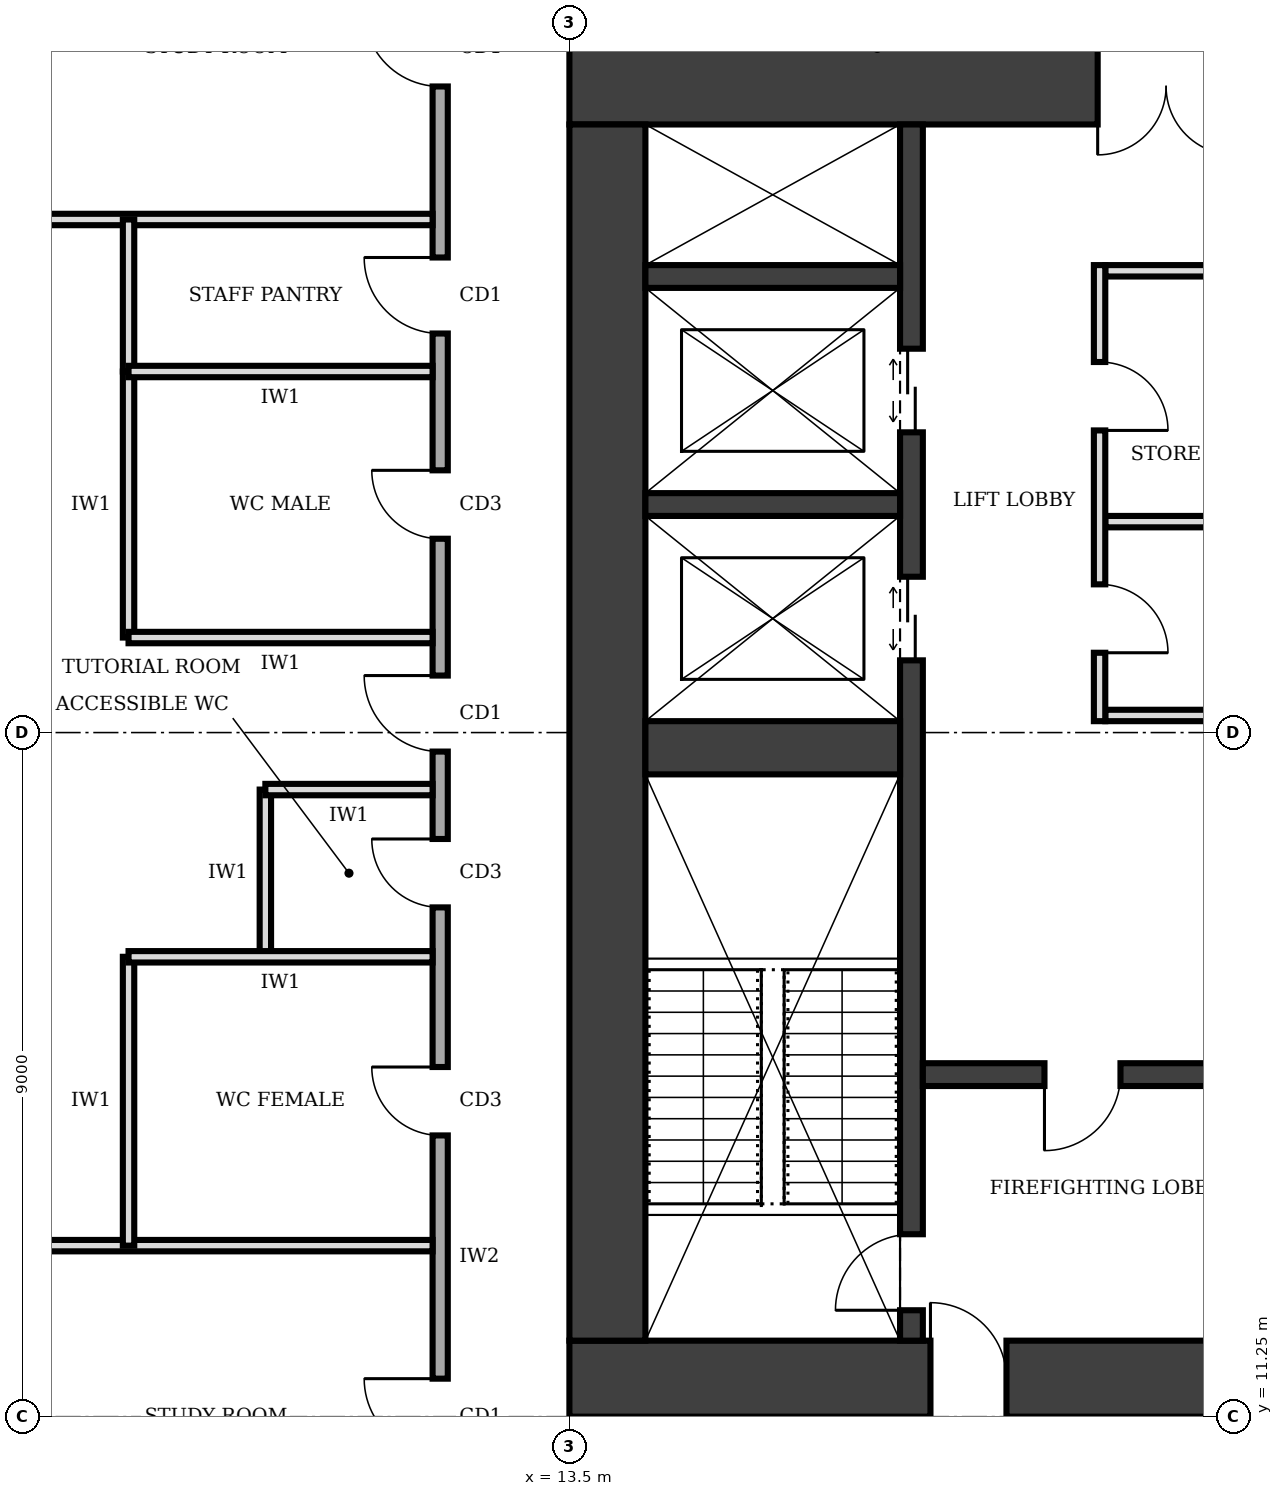
"""IFC4 building model, lengths in metres.
Left out: names, types, materials, properties, quantities, classifications, styles, units other than length and angle.
Written with IfcOpenShell. Run it as: python <this file> out.ifc"""

import sys

from ifc_helpers import new_model, si_unit, direction, frame, frame_2d, origin, place, context, subcontext, project, spatial, rectangle, extrude, element, fill, save


model = new_model("IFC4")
c1 = context("Model", 3, precision=1e-05, world=origin(), true_north=direction((0.0, 1.0)))
c2 = subcontext(c1, "Body", "Model", "MODEL_VIEW")
j1 = project(units=[si_unit("LENGTHUNIT", "METRE"), si_unit("PLANEANGLEUNIT", "RADIAN")], contexts=[c1])
p1 = place(None, origin())
s1 = spatial("IfcSite", under=j1, at=p1, CompositionType="ELEMENT")
p2 = place(p1, origin())
s2 = spatial("IfcBuilding", under=s1, at=p2, CompositionType="ELEMENT")
p3 = place(p2, frame((0.0, 0.0, 37.0)))
s3 = spatial("IfcBuildingStorey", under=s2, at=p3, CompositionType="ELEMENT", Elevation=37.0)
p4 = place(p3, frame((13.5, 11.75, 0.0), z_axis=(0.0, 0.0, 1.0), x_axis=(1.0, 0.0, 0.0)))
e1 = element("IfcWall", 1, at=p4, inside=s3, PredefinedType="SHEAR", context=c2, shape_type="SweptSolid", body=[
    extrude(rectangle(XDim=13.5, YDim=1.0, at=frame_2d((6.75, 0.0))), origin(), (0.0, 0.0, 1.0), 4.0),
])
p5 = place(p4, frame((4.75, 0.0, 0.0)))
e2 = element("IfcOpeningElement", 2, at=p5, cuts=e1, PredefinedType="OPENING", context=c2, shape_type="SweptSolid", body=[
    extrude(rectangle(XDim=1.0, YDim=2.1, at=frame_2d((0.5, 1.05))), frame((0.0, 0.51, 0.0), z_axis=(0.0, -1.0, 0.0), x_axis=(1.0, 0.0, 0.0)), (0.0, 0.0, 1.0), 1.02),
])
p6 = place(p3, frame((27.0, 28.75, 0.0), z_axis=(0.0, 0.0, 1.0), x_axis=(-1.0, 0.0, 0.0)))
e3 = element("IfcWall", 3, at=p6, inside=s3, PredefinedType="SHEAR", context=c2, shape_type="SweptSolid", body=[
    extrude(rectangle(XDim=13.5, YDim=1.0, at=frame_2d((6.75, 0.0))), origin(), (0.0, 0.0, 1.0), 4.0),
])
p7 = place(p6, frame((4.75, 0.0, 0.0)))
e4 = element("IfcOpeningElement", 4, at=p7, cuts=e3, PredefinedType="OPENING", context=c2, shape_type="SweptSolid", body=[
    extrude(rectangle(XDim=1.8, YDim=2.1, at=frame_2d((0.9, 1.05))), frame((0.0, 0.51, 0.0), z_axis=(0.0, -1.0, 0.0), x_axis=(1.0, 0.0, 0.0)), (0.0, 0.0, 1.0), 1.02),
])
p8 = place(p3, frame((14.0, 28.25, 0.0), z_axis=(0.0, 0.0, 1.0), x_axis=(0.0, -1.0, 0.0)))
e5 = element("IfcWall", 5, at=p8, inside=s3, PredefinedType="SHEAR", context=c2, shape_type="SweptSolid", body=[
    extrude(rectangle(XDim=16.0, YDim=1.0, at=frame_2d((8.0, 0.0))), origin(), (0.0, 0.0, 1.0), 4.0),
])
p9 = place(p3, frame((18.0, 12.25, 0.0), z_axis=(0.0, 0.0, 1.0), x_axis=(0.0, 1.0, 0.0)))
e6 = element("IfcWall", 6, at=p9, inside=s3, PredefinedType="SHEAR", context=c2, shape_type="SweptSolid", body=[
    extrude(rectangle(XDim=16.0, YDim=0.3, at=frame_2d((8.0, 0.0))), origin(), (0.0, 0.0, 1.0), 4.0),
])
p10 = place(p9, frame((0.4, 0.0, 0.0)))
e7 = element("IfcOpeningElement", 7, at=p10, cuts=e6, PredefinedType="OPENING", context=c2, shape_type="SweptSolid", body=[
    extrude(rectangle(XDim=1.0, YDim=2.1, at=frame_2d((0.5, 1.05))), frame((0.0, 0.16, 0.0), z_axis=(0.0, -1.0, 0.0), x_axis=(1.0, 0.0, 0.0)), (0.0, 0.0, 1.0), 0.32),
])
p11 = place(p9, frame((8.95, 0.0, 0.0)))
e8 = element("IfcOpeningElement", 8, at=p11, cuts=e6, PredefinedType="OPENING", context=c2, shape_type="SweptSolid", body=[
    extrude(rectangle(XDim=1.1, YDim=2.1, at=frame_2d((0.55, 1.05))), frame((0.0, 0.16, 0.0), z_axis=(0.0, -1.0, 0.0), x_axis=(1.0, 0.0, 0.0)), (0.0, 0.0, 1.0), 0.32),
])
p12 = place(p9, frame((11.95, 0.0, 0.0)))
e9 = element("IfcOpeningElement", 9, at=p12, cuts=e6, PredefinedType="OPENING", context=c2, shape_type="SweptSolid", body=[
    extrude(rectangle(XDim=1.1, YDim=2.1, at=frame_2d((0.55, 1.05))), frame((0.0, 0.16, 0.0), z_axis=(0.0, -1.0, 0.0), x_axis=(1.0, 0.0, 0.0)), (0.0, 0.0, 1.0), 0.32),
])
p13 = place(p3, frame((14.5, 20.05, 0.0), z_axis=(0.0, 0.0, 1.0), x_axis=(1.0, 0.0, 0.0)))
e10 = element("IfcWall", 10, at=p13, inside=s3, PredefinedType="SHEAR", context=c2, shape_type="SweptSolid", body=[
    extrude(rectangle(XDim=3.35, YDim=0.7, at=frame_2d((1.675, 0.0))), origin(), (0.0, 0.0, 1.0), 4.0),
])
p14 = place(p3, frame((18.15, 15.75, 0.0), z_axis=(0.0, 0.0, 1.0), x_axis=(1.0, 0.0, 0.0)))
e11 = element("IfcWall", 11, at=p14, inside=s3, PredefinedType="SHEAR", context=c2, shape_type="SweptSolid", body=[
    extrude(rectangle(XDim=4.2, YDim=0.3, at=frame_2d((2.1, 0.0))), origin(), (0.0, 0.0, 1.0), 4.0),
])
p15 = place(p14, frame((1.6, 0.0, 0.0)))
e12 = element("IfcOpeningElement", 12, at=p15, cuts=e11, PredefinedType="OPENING", context=c2, shape_type="SweptSolid", body=[
    extrude(rectangle(XDim=1.0, YDim=2.1, at=frame_2d((0.5, 1.05))), frame((0.0, 0.16, 0.0), z_axis=(0.0, -1.0, 0.0), x_axis=(1.0, 0.0, 0.0)), (0.0, 0.0, 1.0), 0.32),
])
for number, where, z_axis, x_axis in (
    (13, (14.5, 23.25, 0.0), (0.0, 0.0, 1.0), (1.0, 0.0, 0.0)),
    (14, (14.5, 26.25, 0.0), (0.0, 0.0, 1.0), (1.0, 0.0, 0.0)),
):
    element("IfcWall", number, at=place(p3, frame(where, z_axis=z_axis, x_axis=x_axis)), inside=s3, PredefinedType="SHEAR", context=c2, shape_type="SweptSolid", body=[
        extrude(rectangle(XDim=3.35, YDim=0.3, at=frame_2d((1.675, 0.0))), origin(), (0.0, 0.0, 1.0), 4.0),
    ])
p16 = place(p3, frame((20.475, 20.4, 0.0), z_axis=(0.0, 0.0, 1.0), x_axis=(0.0, 1.0, 0.0)))
e15 = element("IfcWall", 15, at=p16, inside=s3, PredefinedType="PARTITIONING", context=c2, shape_type="SweptSolid", body=[
    extrude(rectangle(XDim=6.0, YDim=0.15, at=frame_2d((3.0, 0.0))), origin(), (0.0, 0.0, 1.0), 3.75),
])
p17 = place(p16, frame((0.9, 0.0, 0.0)))
e16 = element("IfcOpeningElement", 16, at=p17, cuts=e15, PredefinedType="OPENING", context=c2, shape_type="SweptSolid", body=[
    extrude(rectangle(XDim=0.9, YDim=2.1, at=frame_2d((0.45, 1.05))), frame((0.0, 0.085, 0.0), z_axis=(0.0, -1.0, 0.0), x_axis=(1.0, 0.0, 0.0)), (0.0, 0.0, 1.0), 0.17),
])
p18 = place(p16, frame((3.825, 0.0, 0.0)))
e17 = element("IfcOpeningElement", 17, at=p18, cuts=e15, PredefinedType="OPENING", context=c2, shape_type="SweptSolid", body=[
    extrude(rectangle(XDim=0.9, YDim=2.1, at=frame_2d((0.45, 1.05))), frame((0.0, 0.085, 0.0), z_axis=(0.0, -1.0, 0.0), x_axis=(1.0, 0.0, 0.0)), (0.0, 0.0, 1.0), 0.17),
])
for number, where, z_axis, x_axis in (
    (18, (20.55, 20.475, 0.0), (0.0, 0.0, 1.0), (1.0, 0.0, 0.0)),
    (19, (20.55, 23.025, 0.0), (0.0, 0.0, 1.0), (1.0, 0.0, 0.0)),
    (20, (20.55, 26.325, 0.0), (0.0, 0.0, 1.0), (1.0, 0.0, 0.0)),
):
    element("IfcWall", number, at=place(p3, frame(where, z_axis=z_axis, x_axis=x_axis)), inside=s3, PredefinedType="PARTITIONING", context=c2, shape_type="SweptSolid", body=[
        extrude(rectangle(XDim=1.8, YDim=0.15, at=frame_2d((0.9, 0.0))), origin(), (0.0, 0.0, 1.0), 3.75),
    ])
p19 = place(p3, frame((11.8, 31.3, 0.0), z_axis=(0.0, 0.0, 1.0), x_axis=(0.0, -1.0, 0.0)))
e21 = element("IfcWall", 21, at=p19, inside=s3, PredefinedType="SOLIDWALL", context=c2, shape_type="SweptSolid", body=[
    extrude(rectangle(XDim=22.3, YDim=0.2, at=frame_2d((11.15, 0.0))), origin(), (0.0, 0.0, 1.0), 3.75),
])
p20 = place(p19, frame((19.55, 0.0, 0.0)))
e22 = element("IfcOpeningElement", 22, at=p20, cuts=e21, PredefinedType="OPENING", context=c2, shape_type="SweptSolid", body=[
    extrude(rectangle(XDim=1.0, YDim=2.1, at=frame_2d((0.5, 1.05))), frame((0.0, 0.11, 0.0), z_axis=(0.0, -1.0, 0.0), x_axis=(1.0, 0.0, 0.0)), (0.0, 0.0, 1.0), 0.22),
])
p21 = place(p19, frame((15.45, 0.0, 0.0)))
e23 = element("IfcOpeningElement", 23, at=p21, cuts=e21, PredefinedType="OPENING", context=c2, shape_type="SweptSolid", body=[
    extrude(rectangle(XDim=0.9, YDim=2.1, at=frame_2d((0.45, 1.05))), frame((0.0, 0.11, 0.0), z_axis=(0.0, -1.0, 0.0), x_axis=(1.0, 0.0, 0.0)), (0.0, 0.0, 1.0), 0.22),
])
p22 = place(p19, frame((12.45, 0.0, 0.0)))
e24 = element("IfcOpeningElement", 24, at=p22, cuts=e21, PredefinedType="OPENING", context=c2, shape_type="SweptSolid", body=[
    extrude(rectangle(XDim=0.9, YDim=2.1, at=frame_2d((0.45, 1.05))), frame((0.0, 0.11, 0.0), z_axis=(0.0, -1.0, 0.0), x_axis=(1.0, 0.0, 0.0)), (0.0, 0.0, 1.0), 0.22),
])
p23 = place(p19, frame((7.6, 0.0, 0.0)))
e25 = element("IfcOpeningElement", 25, at=p23, cuts=e21, PredefinedType="OPENING", context=c2, shape_type="SweptSolid", body=[
    extrude(rectangle(XDim=0.9, YDim=2.1, at=frame_2d((0.45, 1.05))), frame((0.0, 0.11, 0.0), z_axis=(0.0, -1.0, 0.0), x_axis=(1.0, 0.0, 0.0)), (0.0, 0.0, 1.0), 0.22),
])
p24 = place(p19, frame((4.8, 0.0, 0.0)))
e26 = element("IfcOpeningElement", 26, at=p24, cuts=e21, PredefinedType="OPENING", context=c2, shape_type="SweptSolid", body=[
    extrude(rectangle(XDim=1.0, YDim=2.1, at=frame_2d((0.5, 1.05))), frame((0.0, 0.11, 0.0), z_axis=(0.0, -1.0, 0.0), x_axis=(1.0, 0.0, 0.0)), (0.0, 0.0, 1.0), 0.22),
])
p25 = place(p19, frame((10.3, 0.0, 0.0)))
e27 = element("IfcOpeningElement", 27, at=p25, cuts=e21, PredefinedType="OPENING", context=c2, shape_type="SweptSolid", body=[
    extrude(rectangle(XDim=1.0, YDim=2.1, at=frame_2d((0.5, 1.05))), frame((0.0, 0.11, 0.0), z_axis=(0.0, -1.0, 0.0), x_axis=(1.0, 0.0, 0.0)), (0.0, 0.0, 1.0), 0.22),
])
p26 = place(p19, frame((1.55, 0.0, 0.0)))
e28 = element("IfcOpeningElement", 28, at=p26, cuts=e21, PredefinedType="OPENING", context=c2, shape_type="SweptSolid", body=[
    extrude(rectangle(XDim=1.0, YDim=2.1, at=frame_2d((0.5, 1.05))), frame((0.0, 0.11, 0.0), z_axis=(0.0, -1.0, 0.0), x_axis=(1.0, 0.0, 0.0)), (0.0, 0.0, 1.0), 0.22),
])
for number, where, z_axis, x_axis in (
    (29, (0.3, 13.5, 0.0), (0.0, 0.0, 1.0), (1.0, 0.0, 0.0)),
    (30, (0.3, 27.0, 0.0), (0.0, 0.0, 1.0), (1.0, 0.0, 0.0)),
):
    element("IfcWall", number, at=place(p3, frame(where, z_axis=z_axis, x_axis=x_axis)), inside=s3, PredefinedType="PARTITIONING", context=c2, shape_type="SweptSolid", body=[
        extrude(rectangle(XDim=11.4, YDim=0.15, at=frame_2d((5.7, 0.0))), origin(), (0.0, 0.0, 1.0), 3.75),
    ])
p27 = place(p3, frame((11.7, 17.3, 0.0), z_axis=(0.0, 0.0, 1.0), x_axis=(-1.0, 0.0, 0.0)))
e31 = element("IfcWall", 31, at=p27, inside=s3, PredefinedType="PARTITIONING", context=c2, shape_type="SweptSolid", body=[
    extrude(rectangle(XDim=4.0, YDim=0.15, at=frame_2d((2.0, 0.0))), origin(), (0.0, 0.0, 1.0), 3.75),
])
p28 = place(p3, frame((11.7, 19.5, 0.0), z_axis=(0.0, 0.0, 1.0), x_axis=(-1.0, 0.0, 0.0)))
e32 = element("IfcWall", 32, at=p28, inside=s3, PredefinedType="PARTITIONING", context=c2, shape_type="SweptSolid", body=[
    extrude(rectangle(XDim=2.2, YDim=0.15, at=frame_2d((1.1, 0.0))), origin(), (0.0, 0.0, 1.0), 2.85),
])
for number, where, z_axis, x_axis in (
    (33, (11.7, 21.5, 0.0), (0.0, 0.0, 1.0), (-1.0, 0.0, 0.0)),
    (34, (11.7, 25.0, 0.0), (0.0, 0.0, 1.0), (-1.0, 0.0, 0.0)),
):
    element("IfcWall", number, at=place(p3, frame(where, z_axis=z_axis, x_axis=x_axis)), inside=s3, PredefinedType="PARTITIONING", context=c2, shape_type="SweptSolid", body=[
        extrude(rectangle(XDim=4.0, YDim=0.15, at=frame_2d((2.0, 0.0))), origin(), (0.0, 0.0, 1.0), 3.75),
    ])
p29 = place(p3, frame((7.7, 13.5, 0.0), z_axis=(0.0, 0.0, 1.0), x_axis=(0.0, 1.0, 0.0)))
e35 = element("IfcWall", 35, at=p29, inside=s3, PredefinedType="PARTITIONING", context=c2, shape_type="SweptSolid", body=[
    extrude(rectangle(XDim=3.8, YDim=0.15, at=frame_2d((1.9, 0.0))), origin(), (0.0, 0.0, 1.0), 3.75),
])
p30 = place(p3, frame((9.5, 17.3, 0.0), z_axis=(0.0, 0.0, 1.0), x_axis=(0.0, 1.0, 0.0)))
e36 = element("IfcWall", 36, at=p30, inside=s3, PredefinedType="PARTITIONING", context=c2, shape_type="SweptSolid", body=[
    extrude(rectangle(XDim=2.2, YDim=0.15, at=frame_2d((1.1, 0.0))), origin(), (0.0, 0.0, 1.0), 3.75),
])
p31 = place(p3, frame((7.7, 21.5, 0.0), z_axis=(0.0, 0.0, 1.0), x_axis=(0.0, 1.0, 0.0)))
e37 = element("IfcWall", 37, at=p31, inside=s3, PredefinedType="PARTITIONING", context=c2, shape_type="SweptSolid", body=[
    extrude(rectangle(XDim=3.5, YDim=0.15, at=frame_2d((1.75, 0.0))), origin(), (0.0, 0.0, 1.0), 3.75),
])
p32 = place(p3, frame((7.7, 25.0, 0.0), z_axis=(0.0, 0.0, 1.0), x_axis=(0.0, 1.0, 0.0)))
e38 = element("IfcWall", 38, at=p32, inside=s3, PredefinedType="PARTITIONING", context=c2, shape_type="SweptSolid", body=[
    extrude(rectangle(XDim=2.0, YDim=0.15, at=frame_2d((1.0, 0.0))), origin(), (0.0, 0.0, 1.0), 3.75),
])
p33 = place(p5, origin())
e39 = element("IfcDoor", 39, at=p33, inside=s3, OperationType="SINGLE_SWING_LEFT", PredefinedType="DOOR", context=c2, shape_type="SweptSolid", body=[
    extrude(rectangle(XDim=1.0, YDim=2.1, at=frame_2d((0.5, 1.05))), frame((0.0, 0.025, 0.0), z_axis=(0.0, -1.0, 0.0), x_axis=(1.0, 0.0, 0.0)), (0.0, 0.0, 1.0), 0.05),
])
fill(e2, e39)
p34 = place(p7, origin())
e40 = element("IfcDoor", 40, at=p34, inside=s3, OperationType="DOUBLE_DOOR_SINGLE_SWING", PredefinedType="DOOR", context=c2, shape_type="SweptSolid", body=[
    extrude(rectangle(XDim=1.8, YDim=2.1, at=frame_2d((0.9, 1.05))), frame((0.0, 0.025, 0.0), z_axis=(0.0, -1.0, 0.0), x_axis=(1.0, 0.0, 0.0)), (0.0, 0.0, 1.0), 0.05),
])
fill(e4, e40)
p35 = place(p15, frame((1.0, 0.0, 0.0), z_axis=(0.0, 0.0, 1.0), x_axis=(-1.0, 0.0, 0.0)))
e41 = element("IfcDoor", 41, at=p35, inside=s3, OperationType="SINGLE_SWING_RIGHT", PredefinedType="DOOR", context=c2, shape_type="SweptSolid", body=[
    extrude(rectangle(XDim=1.0, YDim=2.1, at=frame_2d((0.5, 1.05))), frame((0.0, 0.025, 0.0), z_axis=(0.0, -1.0, 0.0), x_axis=(1.0, 0.0, 0.0)), (0.0, 0.0, 1.0), 0.05),
])
fill(e12, e41)
p36 = place(p10, origin())
e42 = element("IfcDoor", 42, at=p36, inside=s3, OperationType="SINGLE_SWING_LEFT", PredefinedType="DOOR", context=c2, shape_type="SweptSolid", body=[
    extrude(rectangle(XDim=1.0, YDim=2.1, at=frame_2d((0.5, 1.05))), frame((0.0, 0.025, 0.0), z_axis=(0.0, -1.0, 0.0), x_axis=(1.0, 0.0, 0.0)), (0.0, 0.0, 1.0), 0.05),
])
fill(e7, e42)
p37 = place(p11, origin())
e43 = element("IfcDoor", 43, at=p37, inside=s3, OperationType="DOUBLE_DOOR_SLIDING", PredefinedType="DOOR", context=c2, shape_type="SweptSolid", body=[
    extrude(rectangle(XDim=1.1, YDim=2.1, at=frame_2d((0.55, 1.05))), frame((0.0, 0.025, 0.0), z_axis=(0.0, -1.0, 0.0), x_axis=(1.0, 0.0, 0.0)), (0.0, 0.0, 1.0), 0.05),
])
fill(e8, e43)
p38 = place(p12, origin())
e44 = element("IfcDoor", 44, at=p38, inside=s3, OperationType="DOUBLE_DOOR_SLIDING", PredefinedType="DOOR", context=c2, shape_type="SweptSolid", body=[
    extrude(rectangle(XDim=1.1, YDim=2.1, at=frame_2d((0.55, 1.05))), frame((0.0, 0.025, 0.0), z_axis=(0.0, -1.0, 0.0), x_axis=(1.0, 0.0, 0.0)), (0.0, 0.0, 1.0), 0.05),
])
fill(e9, e44)
p39 = place(p17, frame((0.9, 0.0, 0.0), z_axis=(0.0, 0.0, 1.0), x_axis=(-1.0, 0.0, 0.0)))
e45 = element("IfcDoor", 45, at=p39, inside=s3, OperationType="SINGLE_SWING_RIGHT", PredefinedType="DOOR", context=c2, shape_type="SweptSolid", body=[
    extrude(rectangle(XDim=0.9, YDim=2.1, at=frame_2d((0.45, 1.05))), frame((0.0, 0.025, 0.0), z_axis=(0.0, -1.0, 0.0), x_axis=(1.0, 0.0, 0.0)), (0.0, 0.0, 1.0), 0.05),
])
fill(e16, e45)
p40 = place(p18, frame((0.9, 0.0, 0.0), z_axis=(0.0, 0.0, 1.0), x_axis=(-1.0, 0.0, 0.0)))
e46 = element("IfcDoor", 46, at=p40, inside=s3, OperationType="SINGLE_SWING_RIGHT", PredefinedType="DOOR", context=c2, shape_type="SweptSolid", body=[
    extrude(rectangle(XDim=0.9, YDim=2.1, at=frame_2d((0.45, 1.05))), frame((0.0, 0.025, 0.0), z_axis=(0.0, -1.0, 0.0), x_axis=(1.0, 0.0, 0.0)), (0.0, 0.0, 1.0), 0.05),
])
fill(e17, e46)
p41 = place(p20, frame((1.0, 0.0, 0.0), z_axis=(0.0, 0.0, 1.0), x_axis=(-1.0, 0.0, 0.0)))
e47 = element("IfcDoor", 47, at=p41, inside=s3, OperationType="SINGLE_SWING_RIGHT", PredefinedType="DOOR", context=c2, shape_type="SweptSolid", body=[
    extrude(rectangle(XDim=1.0, YDim=2.1, at=frame_2d((0.5, 1.05))), frame((0.0, 0.025, 0.0), z_axis=(0.0, -1.0, 0.0), x_axis=(1.0, 0.0, 0.0)), (0.0, 0.0, 1.0), 0.05),
])
fill(e22, e47)
p42 = place(p21, frame((0.9, 0.0, 0.0), z_axis=(0.0, 0.0, 1.0), x_axis=(-1.0, 0.0, 0.0)))
e48 = element("IfcDoor", 48, at=p42, inside=s3, OperationType="SINGLE_SWING_RIGHT", PredefinedType="DOOR", context=c2, shape_type="SweptSolid", body=[
    extrude(rectangle(XDim=0.9, YDim=2.1, at=frame_2d((0.45, 1.05))), frame((0.0, 0.025, 0.0), z_axis=(0.0, -1.0, 0.0), x_axis=(1.0, 0.0, 0.0)), (0.0, 0.0, 1.0), 0.05),
])
fill(e23, e48)
p43 = place(p22, frame((0.9, 0.0, 0.0), z_axis=(0.0, 0.0, 1.0), x_axis=(-1.0, 0.0, 0.0)))
e49 = element("IfcDoor", 49, at=p43, inside=s3, OperationType="SINGLE_SWING_RIGHT", PredefinedType="DOOR", context=c2, shape_type="SweptSolid", body=[
    extrude(rectangle(XDim=0.9, YDim=2.1, at=frame_2d((0.45, 1.05))), frame((0.0, 0.025, 0.0), z_axis=(0.0, -1.0, 0.0), x_axis=(1.0, 0.0, 0.0)), (0.0, 0.0, 1.0), 0.05),
])
fill(e24, e49)
p44 = place(p23, frame((0.9, 0.0, 0.0), z_axis=(0.0, 0.0, 1.0), x_axis=(-1.0, 0.0, 0.0)))
e50 = element("IfcDoor", 50, at=p44, inside=s3, OperationType="SINGLE_SWING_RIGHT", PredefinedType="DOOR", context=c2, shape_type="SweptSolid", body=[
    extrude(rectangle(XDim=0.9, YDim=2.1, at=frame_2d((0.45, 1.05))), frame((0.0, 0.025, 0.0), z_axis=(0.0, -1.0, 0.0), x_axis=(1.0, 0.0, 0.0)), (0.0, 0.0, 1.0), 0.05),
])
fill(e25, e50)
p45 = place(p24, frame((1.0, 0.0, 0.0), z_axis=(0.0, 0.0, 1.0), x_axis=(-1.0, 0.0, 0.0)))
e51 = element("IfcDoor", 51, at=p45, inside=s3, OperationType="SINGLE_SWING_RIGHT", PredefinedType="DOOR", context=c2, shape_type="SweptSolid", body=[
    extrude(rectangle(XDim=1.0, YDim=2.1, at=frame_2d((0.5, 1.05))), frame((0.0, 0.025, 0.0), z_axis=(0.0, -1.0, 0.0), x_axis=(1.0, 0.0, 0.0)), (0.0, 0.0, 1.0), 0.05),
])
fill(e26, e51)
p46 = place(p25, frame((1.0, 0.0, 0.0), z_axis=(0.0, 0.0, 1.0), x_axis=(-1.0, 0.0, 0.0)))
e52 = element("IfcDoor", 52, at=p46, inside=s3, OperationType="SINGLE_SWING_RIGHT", PredefinedType="DOOR", context=c2, shape_type="SweptSolid", body=[
    extrude(rectangle(XDim=1.0, YDim=2.1, at=frame_2d((0.5, 1.05))), frame((0.0, 0.025, 0.0), z_axis=(0.0, -1.0, 0.0), x_axis=(1.0, 0.0, 0.0)), (0.0, 0.0, 1.0), 0.05),
])
fill(e27, e52)
p47 = place(p26, frame((1.0, 0.0, 0.0), z_axis=(0.0, 0.0, 1.0), x_axis=(-1.0, 0.0, 0.0)))
e53 = element("IfcDoor", 53, at=p47, inside=s3, OperationType="SINGLE_SWING_RIGHT", PredefinedType="DOOR", context=c2, shape_type="SweptSolid", body=[
    extrude(rectangle(XDim=1.0, YDim=2.1, at=frame_2d((0.5, 1.05))), frame((0.0, 0.025, 0.0), z_axis=(0.0, -1.0, 0.0), x_axis=(1.0, 0.0, 0.0)), (0.0, 0.0, 1.0), 0.05),
])
fill(e28, e53)
save(model, sys.argv[1])
